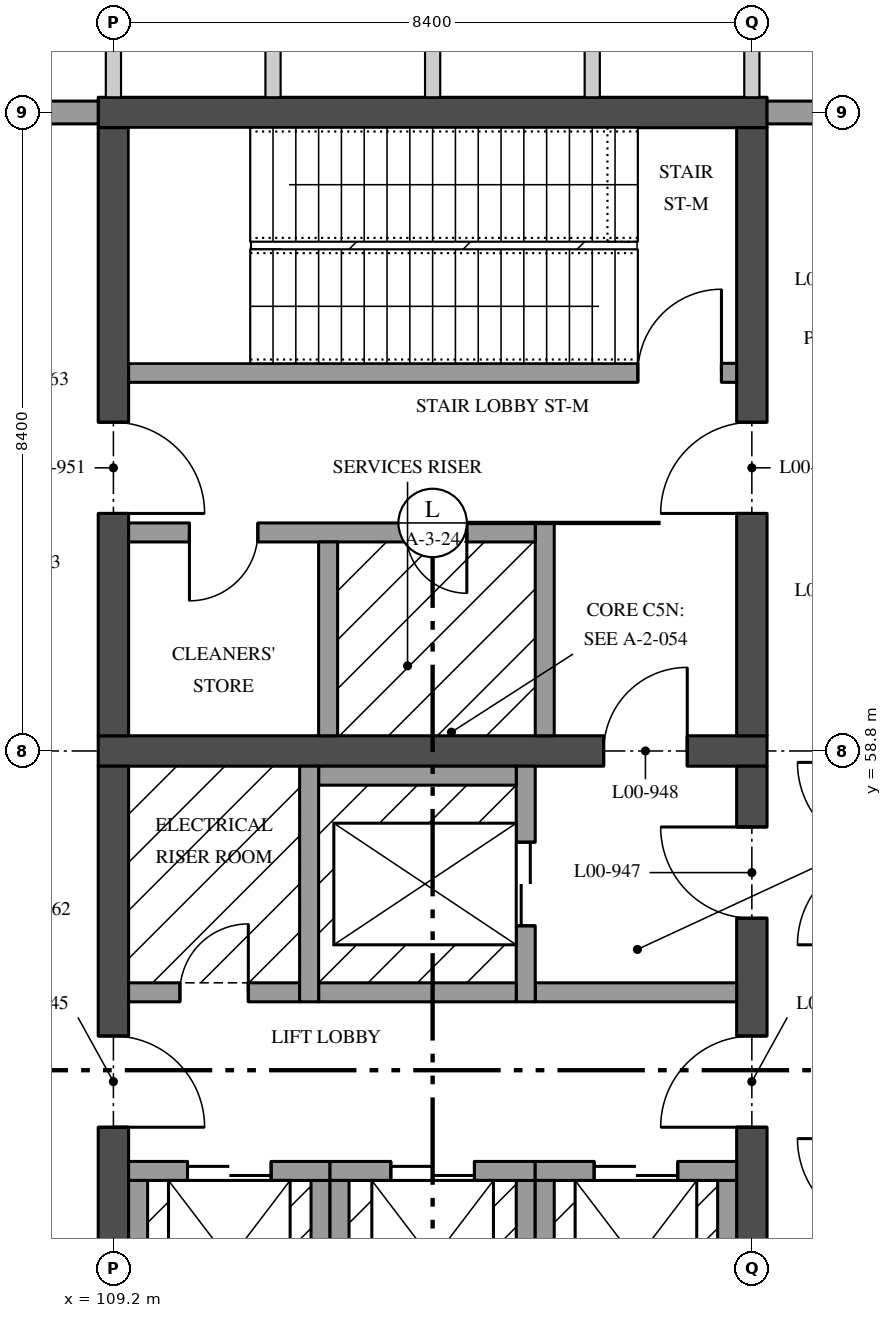
"""IFC4 building model, lengths in metres.
Left out: names, types, materials, properties, quantities, classifications, styles, units other than length and angle.
Written with IfcOpenShell. Run it as: python <this file> out.ifc"""

import sys

from ifc_helpers import new_model, si_unit, direction, frame, frame_2d, origin, place, context, subcontext, project, spatial, rectangle, extrude, element, fill, save


model = new_model("IFC4")
c1 = context("Model", 3, precision=1e-05, world=origin(), true_north=direction((0.0, 1.0)))
c2 = subcontext(c1, "Body", "Model", "MODEL_VIEW")
j1 = project(units=[si_unit("LENGTHUNIT", "METRE"), si_unit("PLANEANGLEUNIT", "RADIAN")], contexts=[c1])
p1 = place(None, origin())
s1 = spatial("IfcSite", under=j1, at=p1, CompositionType="ELEMENT")
p2 = place(p1, origin())
s2 = spatial("IfcBuilding", under=s1, at=p2, CompositionType="ELEMENT")
p3 = place(p2, origin())
s3 = spatial("IfcBuildingStorey", under=s2, at=p3, CompositionType="ELEMENT", Elevation=0.0)
p4 = place(p3, frame((109.0, 58.8, 0.0), z_axis=(0.0, 0.0, 1.0), x_axis=(1.0, 0.0, 0.0)))
e1 = element("IfcWall", 1, at=p4, inside=s3, PredefinedType="SHEAR", context=c2, shape_type="SweptSolid", body=[
    extrude(rectangle(XDim=8.8, YDim=0.4, at=frame_2d((4.4, 0.0))), origin(), (0.0, 0.0, 1.0), 5.05),
])
p5 = place(p4, frame((6.65, 0.0, 0.0)))
e2 = element("IfcOpeningElement", 2, at=p5, cuts=e1, PredefinedType="OPENING", context=c2, shape_type="SweptSolid", body=[
    extrude(rectangle(XDim=1.1, YDim=2.1, at=frame_2d((0.55, 1.05))), frame((0.0, 0.21, 0.0), z_axis=(0.0, -1.0, 0.0), x_axis=(1.0, 0.0, 0.0)), (0.0, 0.0, 1.0), 0.42),
])
p6 = place(p3, frame((109.2, 50.6, 0.0), z_axis=(0.0, 0.0, 1.0), x_axis=(0.0, 1.0, 0.0)))
e3 = element("IfcWall", 3, at=p6, inside=s3, PredefinedType="SHEAR", context=c2, shape_type="SweptSolid", body=[
    extrude(rectangle(XDim=8.0, YDim=0.4, at=frame_2d((4.0, 0.0))), origin(), (0.0, 0.0, 1.0), 5.05),
])
p7 = place(p6, frame((3.25, 0.0, 0.0)))
e4 = element("IfcOpeningElement", 4, at=p7, cuts=e3, PredefinedType="OPENING", context=c2, shape_type="SweptSolid", body=[
    extrude(rectangle(XDim=1.2, YDim=2.1, at=frame_2d((0.6, 1.05))), frame((0.0, 0.21, 0.0), z_axis=(0.0, -1.0, 0.0), x_axis=(1.0, 0.0, 0.0)), (0.0, 0.0, 1.0), 0.42),
])
p8 = place(p3, frame((117.6, 50.6, 0.0), z_axis=(0.0, 0.0, 1.0), x_axis=(0.0, 1.0, 0.0)))
e5 = element("IfcWall", 5, at=p8, inside=s3, PredefinedType="SHEAR", context=c2, shape_type="SweptSolid", body=[
    extrude(rectangle(XDim=8.0, YDim=0.4, at=frame_2d((4.0, 0.0))), origin(), (0.0, 0.0, 1.0), 5.05),
])
p9 = place(p8, frame((3.25, 0.0, 0.0)))
e6 = element("IfcOpeningElement", 6, at=p9, cuts=e5, PredefinedType="OPENING", context=c2, shape_type="SweptSolid", body=[
    extrude(rectangle(XDim=1.2, YDim=2.1, at=frame_2d((0.6, 1.05))), frame((0.0, 0.21, 0.0), z_axis=(0.0, -1.0, 0.0), x_axis=(1.0, 0.0, 0.0)), (0.0, 0.0, 1.0), 0.42),
])
p10 = place(p8, frame((6.0, 0.0, 0.0)))
e7 = element("IfcOpeningElement", 7, at=p10, cuts=e5, PredefinedType="OPENING", context=c2, shape_type="SweptSolid", body=[
    extrude(rectangle(XDim=1.2, YDim=2.1, at=frame_2d((0.6, 1.05))), frame((0.0, 0.21, 0.0), z_axis=(0.0, -1.0, 0.0), x_axis=(1.0, 0.0, 0.0)), (0.0, 0.0, 1.0), 0.42),
])
p11 = place(p3, frame((109.4, 55.625, 0.0), z_axis=(0.0, 0.0, 1.0), x_axis=(1.0, 0.0, 0.0)))
e8 = element("IfcWall", 8, at=p11, inside=s3, PredefinedType="SOLIDWALL", context=c2, shape_type="SweptSolid", body=[
    extrude(rectangle(XDim=2.25, YDim=0.25, at=frame_2d((1.125, 0.0))), origin(), (0.0, 0.0, 1.0), 5.05),
])
p12 = place(p11, frame((0.675, 0.0, 0.0)))
e9 = element("IfcOpeningElement", 9, at=p12, cuts=e8, PredefinedType="OPENING", context=c2, shape_type="SweptSolid", body=[
    extrude(rectangle(XDim=0.9, YDim=2.1, at=frame_2d((0.45, 1.05))), frame((0.0, 0.135, 0.0), z_axis=(0.0, -1.0, 0.0), x_axis=(1.0, 0.0, 0.0)), (0.0, 0.0, 1.0), 0.27),
])
p13 = place(p3, frame((114.75, 55.625, 0.0), z_axis=(0.0, 0.0, 1.0), x_axis=(1.0, 0.0, 0.0)))
e10 = element("IfcWall", 10, at=p13, inside=s3, PredefinedType="SOLIDWALL", context=c2, shape_type="SweptSolid", body=[
    extrude(rectangle(XDim=2.65, YDim=0.25, at=frame_2d((1.325, 0.0))), origin(), (0.0, 0.0, 1.0), 5.05),
])
p14 = place(p3, frame((109.0, 67.2, 0.0), z_axis=(0.0, 0.0, 1.0), x_axis=(1.0, 0.0, 0.0)))
e11 = element("IfcWall", 11, at=p14, inside=s3, PredefinedType="SHEAR", context=c2, shape_type="SweptSolid", body=[
    extrude(rectangle(XDim=8.8, YDim=0.4, at=frame_2d((4.4, 0.0))), origin(), (0.0, 0.0, 1.0), 5.05),
])
p15 = place(p3, frame((109.2, 59.0, 0.0), z_axis=(0.0, 0.0, 1.0), x_axis=(0.0, 1.0, 0.0)))
e12 = element("IfcWall", 12, at=p15, inside=s3, PredefinedType="SHEAR", context=c2, shape_type="SweptSolid", body=[
    extrude(rectangle(XDim=8.0, YDim=0.4, at=frame_2d((4.0, 0.0))), origin(), (0.0, 0.0, 1.0), 5.05),
])
p16 = place(p15, frame((2.925, 0.0, 0.0)))
e13 = element("IfcOpeningElement", 13, at=p16, cuts=e12, PredefinedType="OPENING", context=c2, shape_type="SweptSolid", body=[
    extrude(rectangle(XDim=1.2, YDim=2.1, at=frame_2d((0.6, 1.05))), frame((0.0, 0.21, 0.0), z_axis=(0.0, -1.0, 0.0), x_axis=(1.0, 0.0, 0.0)), (0.0, 0.0, 1.0), 0.42),
])
p17 = place(p3, frame((117.6, 59.0, 0.0), z_axis=(0.0, 0.0, 1.0), x_axis=(0.0, 1.0, 0.0)))
e14 = element("IfcWall", 14, at=p17, inside=s3, PredefinedType="SHEAR", context=c2, shape_type="SweptSolid", body=[
    extrude(rectangle(XDim=8.0, YDim=0.4, at=frame_2d((4.0, 0.0))), origin(), (0.0, 0.0, 1.0), 5.05),
])
p18 = place(p17, frame((2.925, 0.0, 0.0)))
e15 = element("IfcOpeningElement", 15, at=p18, cuts=e14, PredefinedType="OPENING", context=c2, shape_type="SweptSolid", body=[
    extrude(rectangle(XDim=1.2, YDim=2.1, at=frame_2d((0.6, 1.05))), frame((0.0, 0.21, 0.0), z_axis=(0.0, -1.0, 0.0), x_axis=(1.0, 0.0, 0.0)), (0.0, 0.0, 1.0), 0.42),
])
p19 = place(p3, frame((117.4, 63.775, 0.0), z_axis=(0.0, 0.0, 1.0), x_axis=(-1.0, 0.0, 0.0)))
e16 = element("IfcWall", 16, at=p19, inside=s3, PredefinedType="SOLIDWALL", context=c2, shape_type="SweptSolid", body=[
    extrude(rectangle(XDim=8.0, YDim=0.25, at=frame_2d((4.0, 0.0))), origin(), (0.0, 0.0, 1.0), 5.05),
])
p20 = place(p19, frame((0.2, 0.0, 0.0)))
e17 = element("IfcOpeningElement", 17, at=p20, cuts=e16, PredefinedType="OPENING", context=c2, shape_type="SweptSolid", body=[
    extrude(rectangle(XDim=1.1, YDim=2.1, at=frame_2d((0.55, 1.05))), frame((0.0, 0.135, 0.0), z_axis=(0.0, -1.0, 0.0), x_axis=(1.0, 0.0, 0.0)), (0.0, 0.0, 1.0), 0.27),
])
p21 = place(p3, frame((114.875, 61.8, 0.0), z_axis=(0.0, 0.0, 1.0), x_axis=(0.0, -1.0, 0.0)))
e18 = element("IfcWall", 18, at=p21, inside=s3, PredefinedType="SOLIDWALL", context=c2, shape_type="SweptSolid", body=[
    extrude(rectangle(XDim=2.8, YDim=0.25, at=frame_2d((1.4, 0.0))), origin(), (0.0, 0.0, 1.0), 5.05),
])
p22 = place(p3, frame((114.75, 61.675, 0.0), z_axis=(0.0, 0.0, 1.0), x_axis=(-1.0, 0.0, 0.0)))
e19 = element("IfcWall", 19, at=p22, inside=s3, PredefinedType="SOLIDWALL", context=c2, shape_type="SweptSolid", body=[
    extrude(rectangle(XDim=5.35, YDim=0.25, at=frame_2d((2.675, 0.0))), origin(), (0.0, 0.0, 1.0), 5.05),
])
p23 = place(p22, frame((3.65, 0.0, 0.0)))
e20 = element("IfcOpeningElement", 20, at=p23, cuts=e19, PredefinedType="OPENING", context=c2, shape_type="SweptSolid", body=[
    extrude(rectangle(XDim=0.9, YDim=2.1, at=frame_2d((0.45, 1.05))), frame((0.0, 0.135, 0.0), z_axis=(0.0, -1.0, 0.0), x_axis=(1.0, 0.0, 0.0)), (0.0, 0.0, 1.0), 0.27),
])
p24 = place(p22, frame((0.9, 0.0, 0.0)))
e21 = element("IfcOpeningElement", 21, at=p24, cuts=e19, PredefinedType="OPENING", context=c2, shape_type="SweptSolid", body=[
    extrude(rectangle(XDim=0.8, YDim=2.1, at=frame_2d((0.4, 1.05))), frame((0.0, 0.135, 0.0), z_axis=(0.0, -1.0, 0.0), x_axis=(1.0, 0.0, 0.0)), (0.0, 0.0, 1.0), 0.27),
])
p25 = place(p3, frame((112.025, 61.55, 0.0), z_axis=(0.0, 0.0, 1.0), x_axis=(0.0, -1.0, 0.0)))
e22 = element("IfcWall", 22, at=p25, inside=s3, PredefinedType="SOLIDWALL", context=c2, shape_type="SweptSolid", body=[
    extrude(rectangle(XDim=2.55, YDim=0.25, at=frame_2d((1.275, 0.0))), origin(), (0.0, 0.0, 1.0), 5.05),
])
p26 = place(p3, frame((114.625, 55.5, 0.0), z_axis=(0.0, 0.0, 1.0), x_axis=(0.0, 1.0, 0.0)))
e23 = element("IfcWall", 23, at=p26, inside=s3, PredefinedType="SOLIDWALL", context=c2, shape_type="SweptSolid", body=[
    extrude(rectangle(XDim=3.1, YDim=0.25, at=frame_2d((1.55, 0.0))), origin(), (0.0, 0.0, 1.0), 5.05),
])
p27 = place(p26, frame((1.0, 0.0, 0.0)))
e24 = element("IfcOpeningElement", 24, at=p27, cuts=e23, PredefinedType="OPENING", context=c2, shape_type="SweptSolid", body=[
    extrude(rectangle(XDim=1.1, YDim=2.1, at=frame_2d((0.55, 1.05))), frame((0.0, 0.135, 0.0), z_axis=(0.0, -1.0, 0.0), x_axis=(1.0, 0.0, 0.0)), (0.0, 0.0, 1.0), 0.27),
])
for number, where, z_axis, x_axis in (
    (25, (111.9, 58.475, 0.0), (0.0, 0.0, 1.0), (1.0, 0.0, 0.0)),
    (26, (111.9, 55.625, 0.0), (0.0, 0.0, 1.0), (1.0, 0.0, 0.0)),
):
    element("IfcWall", number, at=place(p3, frame(where, z_axis=z_axis, x_axis=x_axis)), inside=s3, PredefinedType="SOLIDWALL", context=c2, shape_type="SweptSolid", body=[
        extrude(rectangle(XDim=2.6, YDim=0.25, at=frame_2d((1.3, 0.0))), origin(), (0.0, 0.0, 1.0), 5.05),
    ])
p28 = place(p3, frame((111.775, 55.5, 0.0), z_axis=(0.0, 0.0, 1.0), x_axis=(0.0, 1.0, 0.0)))
e27 = element("IfcWall", 27, at=p28, inside=s3, PredefinedType="SOLIDWALL", context=c2, shape_type="SweptSolid", body=[
    extrude(rectangle(XDim=3.1, YDim=0.25, at=frame_2d((1.55, 0.0))), origin(), (0.0, 0.0, 1.0), 5.05),
])
p29 = place(p3, frame((111.925, 50.85, 0.0), z_axis=(0.0, 0.0, 1.0), x_axis=(0.0, 1.0, 0.0)))
e28 = element("IfcWall", 28, at=p29, inside=s3, PredefinedType="SOLIDWALL", context=c2, shape_type="SweptSolid", body=[
    extrude(rectangle(XDim=2.3, YDim=0.25, at=frame_2d((1.15, 0.0))), origin(), (0.0, 0.0, 1.0), 5.05),
])
p30 = place(p3, frame((109.4, 53.275, 0.0), z_axis=(0.0, 0.0, 1.0), x_axis=(1.0, 0.0, 0.0)))
e29 = element("IfcWall", 29, at=p30, inside=s3, PredefinedType="SOLIDWALL", context=c2, shape_type="SweptSolid", body=[
    extrude(rectangle(XDim=2.65, YDim=0.25, at=frame_2d((1.325, 0.0))), origin(), (0.0, 0.0, 1.0), 5.05),
])
p31 = place(p30, frame((0.775, 0.0, 0.0)))
e30 = element("IfcOpeningElement", 30, at=p31, cuts=e29, PredefinedType="OPENING", context=c2, shape_type="SweptSolid", body=[
    extrude(rectangle(XDim=1.1, YDim=2.1, at=frame_2d((0.55, 1.05))), frame((0.0, 0.135, 0.0), z_axis=(0.0, -1.0, 0.0), x_axis=(1.0, 0.0, 0.0)), (0.0, 0.0, 1.0), 0.27),
])
for number, where, z_axis, x_axis in (
    (31, (109.525, 50.85, 0.0), (0.0, 0.0, 1.0), (0.0, 1.0, 0.0)),
    (32, (114.625, 50.85, 0.0), (0.0, 0.0, 1.0), (0.0, 1.0, 0.0)),
):
    element("IfcWall", number, at=place(p3, frame(where, z_axis=z_axis, x_axis=x_axis)), inside=s3, PredefinedType="SOLIDWALL", context=c2, shape_type="SweptSolid", body=[
        extrude(rectangle(XDim=2.3, YDim=0.25, at=frame_2d((1.15, 0.0))), origin(), (0.0, 0.0, 1.0), 5.05),
    ])
p32 = place(p3, frame((112.05, 53.275, 0.0), z_axis=(0.0, 0.0, 1.0), x_axis=(1.0, 0.0, 0.0)))
e33 = element("IfcWall", 33, at=p32, inside=s3, PredefinedType="SOLIDWALL", context=c2, shape_type="SweptSolid", body=[
    extrude(rectangle(XDim=2.7, YDim=0.25, at=frame_2d((1.35, 0.0))), origin(), (0.0, 0.0, 1.0), 5.05),
])
p33 = place(p32, frame((0.8, 0.0, 0.0)))
e34 = element("IfcOpeningElement", 34, at=p33, cuts=e33, PredefinedType="OPENING", context=c2, shape_type="SweptSolid", body=[
    extrude(rectangle(XDim=1.1, YDim=2.1, at=frame_2d((0.55, 1.05))), frame((0.0, 0.135, 0.0), z_axis=(0.0, -1.0, 0.0), x_axis=(1.0, 0.0, 0.0)), (0.0, 0.0, 1.0), 0.27),
])
for number, where, z_axis, x_axis in (
    (35, (112.175, 50.85, 0.0), (0.0, 0.0, 1.0), (0.0, 1.0, 0.0)),
    (36, (117.275, 50.85, 0.0), (0.0, 0.0, 1.0), (0.0, 1.0, 0.0)),
):
    element("IfcWall", number, at=place(p3, frame(where, z_axis=z_axis, x_axis=x_axis)), inside=s3, PredefinedType="SOLIDWALL", context=c2, shape_type="SweptSolid", body=[
        extrude(rectangle(XDim=2.3, YDim=0.25, at=frame_2d((1.15, 0.0))), origin(), (0.0, 0.0, 1.0), 5.05),
    ])
p34 = place(p3, frame((114.75, 53.275, 0.0), z_axis=(0.0, 0.0, 1.0), x_axis=(1.0, 0.0, 0.0)))
e37 = element("IfcWall", 37, at=p34, inside=s3, PredefinedType="SOLIDWALL", context=c2, shape_type="SweptSolid", body=[
    extrude(rectangle(XDim=2.65, YDim=0.25, at=frame_2d((1.325, 0.0))), origin(), (0.0, 0.0, 1.0), 5.05),
])
p35 = place(p34, frame((0.775, 0.0, 0.0)))
e38 = element("IfcOpeningElement", 38, at=p35, cuts=e37, PredefinedType="OPENING", context=c2, shape_type="SweptSolid", body=[
    extrude(rectangle(XDim=1.1, YDim=2.1, at=frame_2d((0.55, 1.05))), frame((0.0, 0.135, 0.0), z_axis=(0.0, -1.0, 0.0), x_axis=(1.0, 0.0, 0.0)), (0.0, 0.0, 1.0), 0.27),
])
p36 = place(p3, frame((114.875, 50.85, 0.0), z_axis=(0.0, 0.0, 1.0), x_axis=(0.0, 1.0, 0.0)))
e39 = element("IfcWall", 39, at=p36, inside=s3, PredefinedType="SOLIDWALL", context=c2, shape_type="SweptSolid", body=[
    extrude(rectangle(XDim=2.3, YDim=0.25, at=frame_2d((1.15, 0.0))), origin(), (0.0, 0.0, 1.0), 5.05),
])
for number, where, z_axis, x_axis in (
    (40, (109.2, 67.4, 0.0), (0.0, 0.0, 1.0), (0.0, 1.0, 0.0)),
    (41, (111.3, 67.4, 0.0), (0.0, 0.0, 1.0), (0.0, 1.0, 0.0)),
    (42, (113.4, 67.4, 0.0), (0.0, 0.0, 1.0), (0.0, 1.0, 0.0)),
    (43, (115.5, 67.4, 0.0), (0.0, 0.0, 1.0), (0.0, 1.0, 0.0)),
    (44, (117.6, 67.4, 0.0), (0.0, 0.0, 1.0), (0.0, 1.0, 0.0)),
):
    element("IfcWall", number, at=place(p3, frame(where, z_axis=z_axis, x_axis=x_axis)), inside=s3, PredefinedType="PARTITIONING", context=c2, shape_type="SweptSolid", body=[
        extrude(rectangle(XDim=3.0, YDim=0.2, at=frame_2d((1.5, 0.0))), origin(), (0.0, 0.0, 1.0), 5.05),
    ])
for number, where, z_axis, x_axis in (
    (45, (125.57, 67.2, 0.0), (0.0, 0.0, 1.0), (-1.0, 0.0, 0.0)),
    (46, (109.0, 67.2, 0.0), (0.0, 0.0, 1.0), (-1.0, 0.0, 0.0)),
):
    element("IfcWall", number, at=place(p3, frame(where, z_axis=z_axis, x_axis=x_axis)), inside=s3, PredefinedType="SOLIDWALL", context=c2, shape_type="SweptSolid", body=[
        extrude(rectangle(XDim=7.77, YDim=0.3, at=frame_2d((3.885, 0.0))), origin(), (0.0, 0.0, 1.0), 5.05),
    ])
p37 = place(p7, frame((1.2, 0.0, 0.0), z_axis=(0.0, 0.0, 1.0), x_axis=(-1.0, 0.0, 0.0)))
e47 = element("IfcDoor", 47, at=p37, inside=s3, OperationType="SINGLE_SWING_LEFT", PredefinedType="DOOR", context=c2, shape_type="SweptSolid", body=[
    extrude(rectangle(XDim=1.2, YDim=2.1, at=frame_2d((0.6, 1.05))), frame((0.0, 0.035, 0.0), z_axis=(0.0, -1.0, 0.0), x_axis=(1.0, 0.0, 0.0)), (0.0, 0.0, 1.0), 0.07),
])
fill(e4, e47)
p38 = place(p9, origin())
e48 = element("IfcDoor", 48, at=p38, inside=s3, OperationType="SINGLE_SWING_RIGHT", PredefinedType="DOOR", context=c2, shape_type="SweptSolid", body=[
    extrude(rectangle(XDim=1.2, YDim=2.1, at=frame_2d((0.6, 1.05))), frame((0.0, 0.035, 0.0), z_axis=(0.0, -1.0, 0.0), x_axis=(1.0, 0.0, 0.0)), (0.0, 0.0, 1.0), 0.07),
])
fill(e6, e48)
p39 = place(p10, origin())
e49 = element("IfcDoor", 49, at=p39, inside=s3, OperationType="SINGLE_SWING_LEFT", PredefinedType="DOOR", context=c2, shape_type="SweptSolid", body=[
    extrude(rectangle(XDim=1.2, YDim=2.1, at=frame_2d((0.6, 1.05))), frame((0.0, 0.035, 0.0), z_axis=(0.0, -1.0, 0.0), x_axis=(1.0, 0.0, 0.0)), (0.0, 0.0, 1.0), 0.07),
])
fill(e7, e49)
p40 = place(p5, origin())
e50 = element("IfcDoor", 50, at=p40, inside=s3, OperationType="SINGLE_SWING_LEFT", PredefinedType="DOOR", context=c2, shape_type="SweptSolid", body=[
    extrude(rectangle(XDim=1.1, YDim=2.1, at=frame_2d((0.55, 1.05))), frame((0.0, 0.035, 0.0), z_axis=(0.0, -1.0, 0.0), x_axis=(1.0, 0.0, 0.0)), (0.0, 0.0, 1.0), 0.07),
])
fill(e2, e50)
p41 = place(p12, origin())
e51 = element("IfcDoor", 51, at=p41, inside=s3, OperationType="SINGLE_SWING_LEFT", PredefinedType="DOOR", context=c2, shape_type="SweptSolid", body=[
    extrude(rectangle(XDim=0.9, YDim=2.1, at=frame_2d((0.45, 1.05))), frame((0.0, 0.05, 0.0), z_axis=(0.0, -1.0, 0.0), x_axis=(1.0, 0.0, 0.0)), (0.0, 0.0, 1.0), 0.1),
])
fill(e9, e51)
p42 = place(p23, origin())
e52 = element("IfcDoor", 52, at=p42, inside=s3, OperationType="SINGLE_SWING_LEFT", PredefinedType="DOOR", context=c2, shape_type="SweptSolid", body=[
    extrude(rectangle(XDim=0.9, YDim=2.1, at=frame_2d((0.45, 1.05))), frame((0.0, 0.035, 0.0), z_axis=(0.0, -1.0, 0.0), x_axis=(1.0, 0.0, 0.0)), (0.0, 0.0, 1.0), 0.07),
])
fill(e20, e52)
p43 = place(p16, frame((1.2, 0.0, 0.0), z_axis=(0.0, 0.0, 1.0), x_axis=(-1.0, 0.0, 0.0)))
e53 = element("IfcDoor", 53, at=p43, inside=s3, OperationType="SINGLE_SWING_LEFT", PredefinedType="DOOR", context=c2, shape_type="SweptSolid", body=[
    extrude(rectangle(XDim=1.2, YDim=2.1, at=frame_2d((0.6, 1.05))), frame((0.0, 0.035, 0.0), z_axis=(0.0, -1.0, 0.0), x_axis=(1.0, 0.0, 0.0)), (0.0, 0.0, 1.0), 0.07),
])
fill(e13, e53)
p44 = place(p18, origin())
e54 = element("IfcDoor", 54, at=p44, inside=s3, OperationType="SINGLE_SWING_RIGHT", PredefinedType="DOOR", context=c2, shape_type="SweptSolid", body=[
    extrude(rectangle(XDim=1.2, YDim=2.1, at=frame_2d((0.6, 1.05))), frame((0.0, 0.035, 0.0), z_axis=(0.0, -1.0, 0.0), x_axis=(1.0, 0.0, 0.0)), (0.0, 0.0, 1.0), 0.07),
])
fill(e15, e54)
p45 = place(p24, origin())
e55 = element("IfcDoor", 55, at=p45, inside=s3, OperationType="SINGLE_SWING_RIGHT", PredefinedType="DOOR", context=c2, shape_type="SweptSolid", body=[
    extrude(rectangle(XDim=0.8, YDim=2.1, at=frame_2d((0.4, 1.05))), frame((0.0, 0.035, 0.0), z_axis=(0.0, -1.0, 0.0), x_axis=(1.0, 0.0, 0.0)), (0.0, 0.0, 1.0), 0.07),
])
fill(e21, e55)
p46 = place(p20, frame((1.1, 0.0, 0.0), z_axis=(0.0, 0.0, 1.0), x_axis=(-1.0, 0.0, 0.0)))
e56 = element("IfcDoor", 56, at=p46, inside=s3, OperationType="SINGLE_SWING_LEFT", PredefinedType="DOOR", context=c2, shape_type="SweptSolid", body=[
    extrude(rectangle(XDim=1.1, YDim=2.1, at=frame_2d((0.55, 1.05))), frame((0.0, 0.035, 0.0), z_axis=(0.0, -1.0, 0.0), x_axis=(1.0, 0.0, 0.0)), (0.0, 0.0, 1.0), 0.07),
])
fill(e17, e56)
p47 = place(p27, origin())
e57 = element("IfcDoor", 57, at=p47, inside=s3, OperationType="DOUBLE_DOOR_SLIDING", PredefinedType="DOOR", context=c2, shape_type="SweptSolid", body=[
    extrude(rectangle(XDim=1.1, YDim=2.1, at=frame_2d((0.55, 1.05))), frame((0.0, 0.04, 0.0), z_axis=(0.0, -1.0, 0.0), x_axis=(1.0, 0.0, 0.0)), (0.0, 0.0, 1.0), 0.08),
])
fill(e24, e57)
p48 = place(p31, origin())
e58 = element("IfcDoor", 58, at=p48, inside=s3, OperationType="DOUBLE_DOOR_SLIDING", PredefinedType="DOOR", context=c2, shape_type="SweptSolid", body=[
    extrude(rectangle(XDim=1.1, YDim=2.1, at=frame_2d((0.55, 1.05))), frame((0.0, 0.04, 0.0), z_axis=(0.0, -1.0, 0.0), x_axis=(1.0, 0.0, 0.0)), (0.0, 0.0, 1.0), 0.08),
])
fill(e30, e58)
p49 = place(p33, origin())
e59 = element("IfcDoor", 59, at=p49, inside=s3, OperationType="DOUBLE_DOOR_SLIDING", PredefinedType="DOOR", context=c2, shape_type="SweptSolid", body=[
    extrude(rectangle(XDim=1.1, YDim=2.1, at=frame_2d((0.55, 1.05))), frame((0.0, 0.04, 0.0), z_axis=(0.0, -1.0, 0.0), x_axis=(1.0, 0.0, 0.0)), (0.0, 0.0, 1.0), 0.08),
])
fill(e34, e59)
p50 = place(p35, origin())
e60 = element("IfcDoor", 60, at=p50, inside=s3, OperationType="DOUBLE_DOOR_SLIDING", PredefinedType="DOOR", context=c2, shape_type="SweptSolid", body=[
    extrude(rectangle(XDim=1.1, YDim=2.1, at=frame_2d((0.55, 1.05))), frame((0.0, 0.04, 0.0), z_axis=(0.0, -1.0, 0.0), x_axis=(1.0, 0.0, 0.0)), (0.0, 0.0, 1.0), 0.08),
])
fill(e38, e60)
save(model, sys.argv[1])
